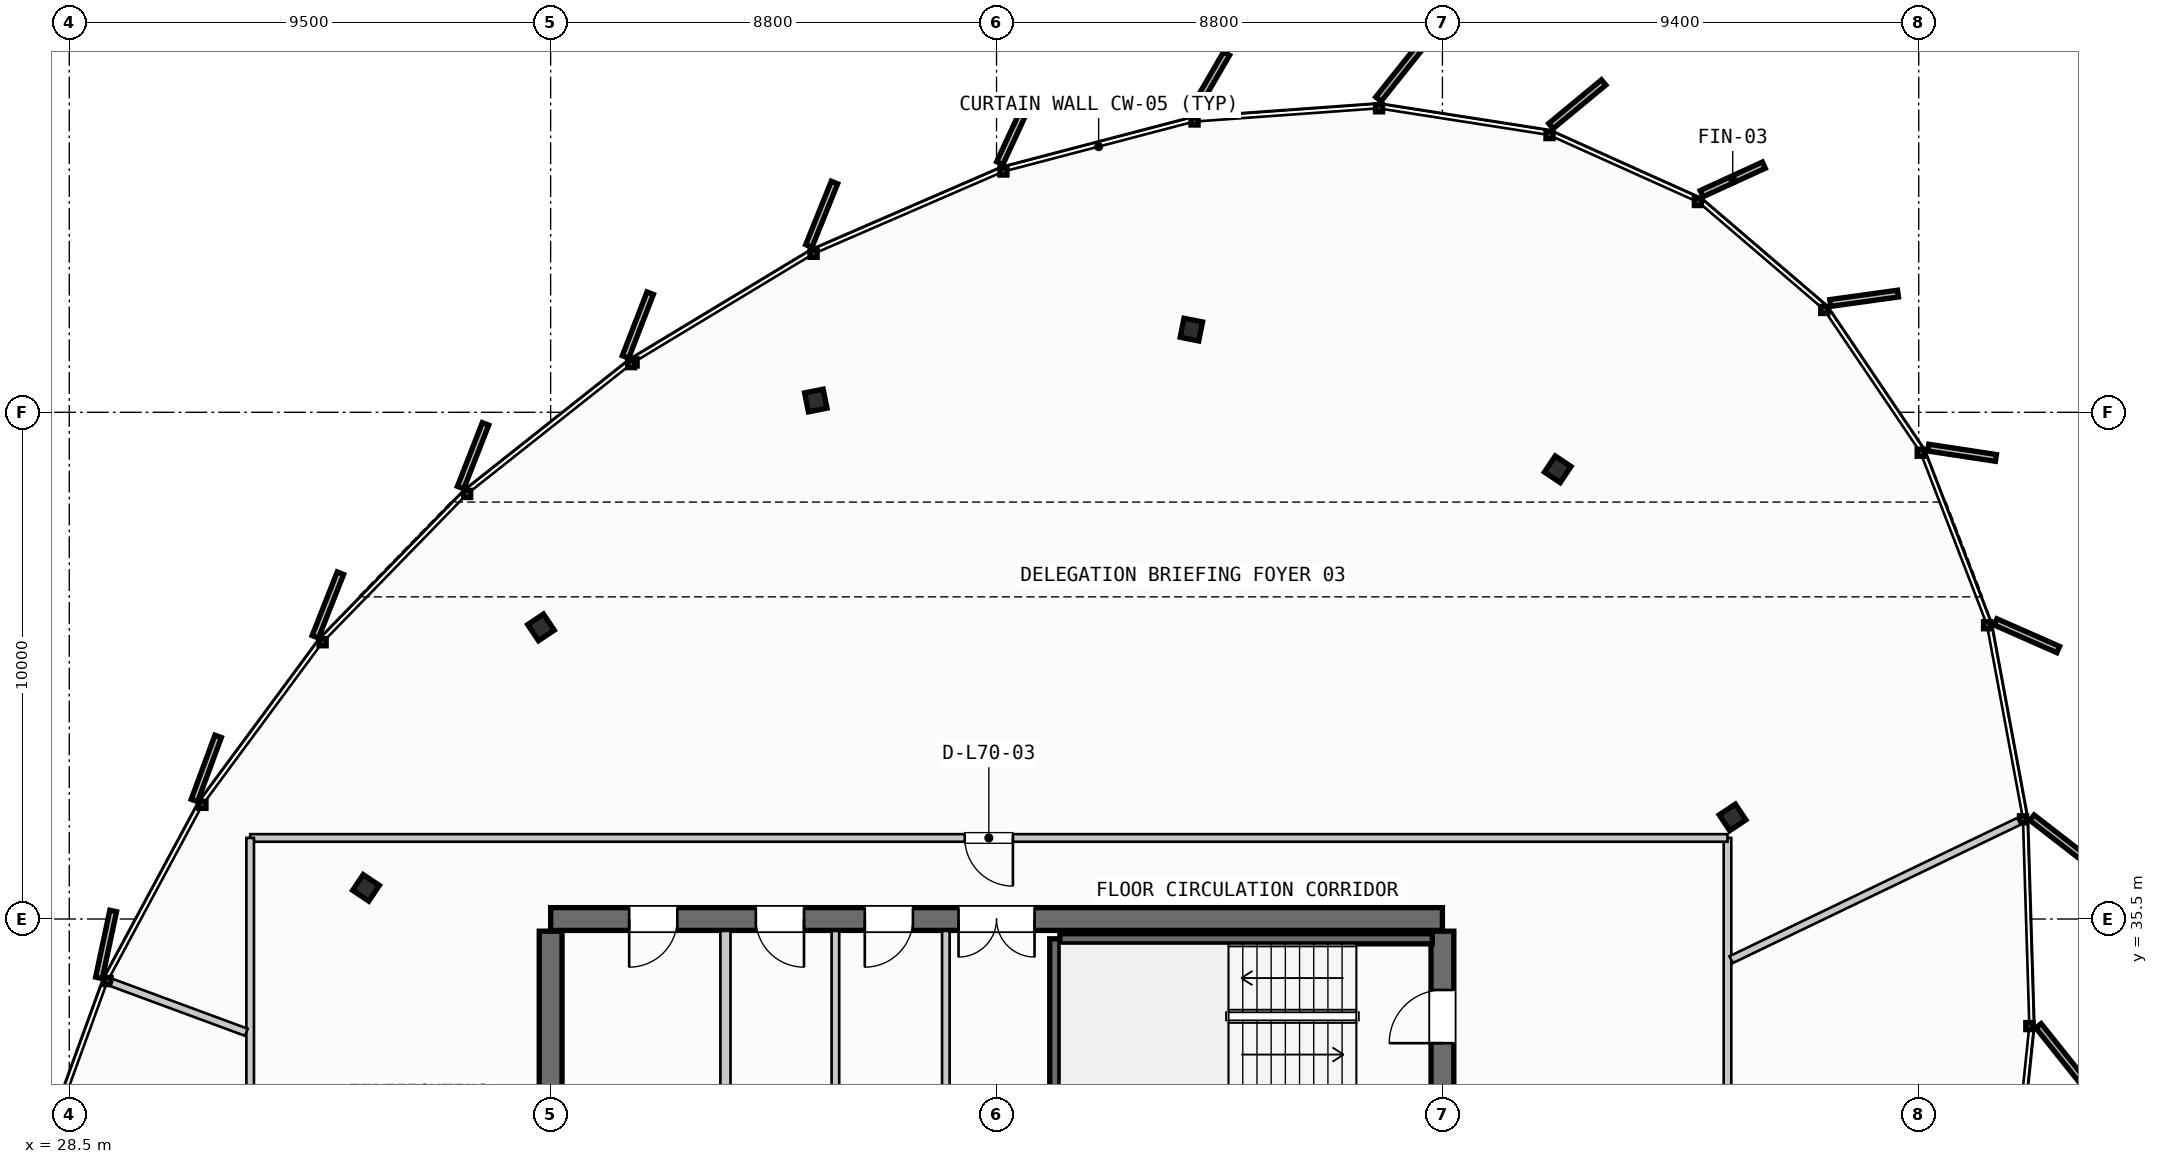
"""IFC4 building model, lengths in metres.
Left out: names, types, materials, properties, quantities, classifications, styles, units other than length and angle.
Written with IfcOpenShell. Run it as: python <this file> out.ifc"""

import sys

from ifc_helpers import new_model, si_unit, direction, frame, frame_2d, origin, origin_2d, place, context, subcontext, project, spatial, rectangle, i_section, extrude, source, transform, mapped, element, fill, save


model = new_model("IFC4")
c1 = context("Model", 3, precision=1e-05, world=origin(), true_north=direction((0.0, 1.0)))
c2 = subcontext(c1, "Body", "Model", "MODEL_VIEW")
j1 = project(units=[si_unit("LENGTHUNIT", "METRE"), si_unit("PLANEANGLEUNIT", "RADIAN")], contexts=[c1])
p1 = place(None, origin())
s1 = spatial("IfcSite", under=j1, at=p1, CompositionType="ELEMENT")
p2 = place(p1, origin())
s2 = spatial("IfcBuilding", under=s1, at=p2, CompositionType="ELEMENT")
p3 = place(p2, frame((0.0, 0.0, 266.35)))
s3 = spatial("IfcBuildingStorey", under=s2, at=p3, CompositionType="ELEMENT", Elevation=266.35)
p4 = place(p3, frame((55.6, 35.5, 0.0), z_axis=(0.0, 0.0, 1.0), x_axis=(-1.0, 0.0, 0.0)))
e1 = element("IfcWall", 1, at=p4, inside=s3, PredefinedType="SHEAR", context=c2, shape_type="SweptSolid", body=[
    extrude(rectangle(XDim=17.6, YDim=0.45, at=frame_2d((8.8, 0.0))), origin(), (0.0, 0.0, 1.0), 3.21),
])
p5 = place(p4, frame((8.05, 0.0, 0.0)))
e2 = element("IfcOpeningElement", 2, at=p5, cuts=e1, PredefinedType="OPENING", context=c2, shape_type="SweptSolid", body=[
    extrude(rectangle(XDim=1.5, YDim=2.2, at=frame_2d((0.75, 1.1))), frame((0.0, 0.235, 0.0), z_axis=(0.0, -1.0, 0.0), x_axis=(1.0, 0.0, 0.0)), (0.0, 0.0, 1.0), 0.47),
])
p6 = place(p4, frame((15.1, 0.0, 0.0)))
e3 = element("IfcOpeningElement", 3, at=p6, cuts=e1, PredefinedType="OPENING", context=c2, shape_type="SweptSolid", body=[
    extrude(rectangle(XDim=0.95, YDim=2.15, at=frame_2d((0.475, 1.075))), frame((0.0, 0.235, 0.0), z_axis=(0.0, -1.0, 0.0), x_axis=(1.0, 0.0, 0.0)), (0.0, 0.0, 1.0), 0.47),
])
p7 = place(p4, frame((12.6, 0.0, 0.0)))
e4 = element("IfcOpeningElement", 4, at=p7, cuts=e1, PredefinedType="OPENING", context=c2, shape_type="SweptSolid", body=[
    extrude(rectangle(XDim=0.95, YDim=2.15, at=frame_2d((0.475, 1.075))), frame((0.0, 0.235, 0.0), z_axis=(0.0, -1.0, 0.0), x_axis=(1.0, 0.0, 0.0)), (0.0, 0.0, 1.0), 0.47),
])
p8 = place(p4, frame((10.45, 0.0, 0.0)))
e5 = element("IfcOpeningElement", 5, at=p8, cuts=e1, PredefinedType="OPENING", context=c2, shape_type="SweptSolid", body=[
    extrude(rectangle(XDim=0.95, YDim=2.15, at=frame_2d((0.475, 1.075))), frame((0.0, 0.235, 0.0), z_axis=(0.0, -1.0, 0.0), x_axis=(1.0, 0.0, 0.0)), (0.0, 0.0, 1.0), 0.47),
])
p9 = place(p3, frame((38.0, 35.26, 0.0), z_axis=(0.0, 0.0, 1.0), x_axis=(0.0, -1.0, 0.0)))
e6 = element("IfcWall", 6, at=p9, inside=s3, PredefinedType="SHEAR", context=c2, shape_type="SweptSolid", body=[
    extrude(rectangle(XDim=14.92, YDim=0.45, at=frame_2d((7.46, 0.0))), origin(), (0.0, 0.0, 1.0), 3.21),
])
p10 = place(p9, frame((5.21, 0.0, 0.0)))
e7 = element("IfcOpeningElement", 7, at=p10, cuts=e6, PredefinedType="OPENING", context=c2, shape_type="SweptSolid", body=[
    extrude(rectangle(XDim=1.1, YDim=2.2, at=frame_2d((0.55, 1.1))), frame((0.0, 0.235, 0.0), z_axis=(0.0, -1.0, 0.0), x_axis=(1.0, 0.0, 0.0)), (0.0, 0.0, 1.0), 0.47),
])
p11 = place(p3, frame((55.6, 20.34, 0.0), z_axis=(0.0, 0.0, 1.0), x_axis=(0.0, 1.0, 0.0)))
e8 = element("IfcWall", 8, at=p11, inside=s3, PredefinedType="SHEAR", context=c2, shape_type="SweptSolid", body=[
    extrude(rectangle(XDim=14.92, YDim=0.45, at=frame_2d((7.46, 0.0))), origin(), (0.0, 0.0, 1.0), 3.21),
])
p12 = place(p11, frame((12.71, 0.0, 0.0)))
e9 = element("IfcOpeningElement", 9, at=p12, cuts=e8, PredefinedType="OPENING", context=c2, shape_type="SweptSolid", body=[
    extrude(rectangle(XDim=1.05, YDim=2.15, at=frame_2d((0.525, 1.075))), frame((0.0, 0.235, 0.0), z_axis=(0.0, -1.0, 0.0), x_axis=(1.0, 0.0, 0.0)), (0.0, 0.0, 1.0), 0.47),
])
p13 = place(p11, frame((8.61, 0.0, 0.0)))
e10 = element("IfcOpeningElement", 10, at=p13, cuts=e8, PredefinedType="OPENING", context=c2, shape_type="SweptSolid", body=[
    extrude(rectangle(XDim=1.1, YDim=2.2, at=frame_2d((0.55, 1.1))), frame((0.0, 0.235, 0.0), z_axis=(0.0, -1.0, 0.0), x_axis=(1.0, 0.0, 0.0)), (0.0, 0.0, 1.0), 0.47),
])
m1 = source(origin(), c2, "Body", "SweptSolid", [
    extrude(i_section(OverallWidth=0.374, OverallDepth=0.383, WebThickness=0.017, FlangeThickness=0.026, FilletRadius=0.015, at=origin_2d()), origin(), (0.0, 0.0, 1.0), 3.21),
])
for number, where, z_axis, x_axis in (
    (11, (61.326, 37.506, 0.0), (0.0, 0.0, 1.0), (0.831, 0.556, 0.0)),
    (12, (57.875, 44.375, 0.0), (0.0, 0.0, 1.0), (0.556, 0.831, 0.0)),
    (13, (50.645, 47.132, 0.0), (0.0, 0.0, 1.0), (0.195, 0.981, 0.0)),
    (14, (43.233, 45.732, 0.0), (0.0, 0.0, 1.0), (-0.195, 0.981, 0.0)),
    (15, (37.81, 41.255, 0.0), (0.0, 0.0, 1.0), (-0.556, 0.831, 0.0)),
    (16, (34.356, 36.115, 0.0), (0.0, 0.0, 1.0), (-0.831, 0.556, 0.0)),
):
    element("IfcColumn", number, at=place(p3, frame(where, z_axis=z_axis, x_axis=x_axis)), inside=s3, PredefinedType="COLUMN", context=c2, shape_type="MappedRepresentation", body=[
        mapped(m1, transform((0.0, 0.0, 0.0), scale=1.0)),
    ])
p14 = place(p3, frame((47.95, 32.05, 0.0), z_axis=(0.0, 0.0, 1.0), x_axis=(0.0, 1.0, 0.0)))
e17 = element("IfcWall", 17, at=p14, inside=s3, PredefinedType="SHEAR", context=c2, shape_type="SweptSolid", body=[
    extrude(rectangle(XDim=3.06, YDim=0.2, at=frame_2d((1.53, 0.0))), origin(), (0.0, 0.0, 1.0), 3.21),
])
p15 = place(p3, frame((48.05, 35.11, 0.0), z_axis=(0.0, 0.0, 1.0), x_axis=(1.0, 0.0, 0.0)))
e18 = element("IfcWall", 18, at=p15, inside=s3, PredefinedType="SHEAR", context=c2, shape_type="SweptSolid", body=[
    extrude(rectangle(XDim=7.35, YDim=0.2, at=frame_2d((3.675, 0.0))), origin(), (0.0, 0.0, 1.0), 3.21),
])
p16 = place(p3, frame((41.45, 31.85, 0.0), z_axis=(0.0, 0.0, 1.0), x_axis=(0.0, 1.0, 0.0)))
e19 = element("IfcWall", 19, at=p16, inside=s3, PredefinedType="PARTITIONING", context=c2, shape_type="SweptSolid", body=[
    extrude(rectangle(XDim=3.415, YDim=0.2, at=frame_2d((1.708, 0.0))), origin(), (0.0, 0.0, 1.0), 2.595),
])
p17 = place(p3, frame((45.8, 31.85, 0.0), z_axis=(0.0, 0.0, 1.0), x_axis=(0.0, 1.0, 0.0)))
e20 = element("IfcWall", 20, at=p17, inside=s3, PredefinedType="PARTITIONING", context=c2, shape_type="SweptSolid", body=[
    extrude(rectangle(XDim=3.415, YDim=0.15, at=frame_2d((1.708, 0.0))), origin(), (0.0, 0.0, 1.0), 2.595),
])
p18 = place(p3, frame((43.62, 31.85, 0.0), z_axis=(0.0, 0.0, 1.0), x_axis=(0.0, 1.0, 0.0)))
e21 = element("IfcWall", 21, at=p18, inside=s3, PredefinedType="PLUMBINGWALL", context=c2, shape_type="SweptSolid", body=[
    extrude(rectangle(XDim=3.415, YDim=0.15, at=frame_2d((1.708, 0.0))), origin(), (0.0, 0.0, 1.0), 2.595),
])
p19 = place(p3, frame((61.226, 18.269, 0.0), z_axis=(0.0, 0.0, 1.0), x_axis=(0.0, 1.0, 0.0)))
e22 = element("IfcWall", 22, at=p19, inside=s3, PredefinedType="PARTITIONING", context=c2, shape_type="SweptSolid", body=[
    extrude(rectangle(XDim=18.831, YDim=0.15, at=frame_2d((9.416, 0.0))), origin(), (0.0, 0.0, 1.0), 2.595),
])
p20 = place(p19, frame((8.028, 0.0, 0.0)))
e23 = element("IfcOpeningElement", 23, at=p20, cuts=e22, PredefinedType="OPENING", context=c2, shape_type="SweptSolid", body=[
    extrude(rectangle(XDim=0.95, YDim=2.15, at=frame_2d((0.475, 1.075))), frame((0.0, 0.085, 0.0), z_axis=(0.0, -1.0, 0.0), x_axis=(1.0, 0.0, 0.0)), (0.0, 0.0, 1.0), 0.17),
])
p21 = place(p3, frame((61.226, 37.1, 0.0), z_axis=(0.0, 0.0, 1.0), x_axis=(-1.0, 0.0, 0.0)))
e24 = element("IfcWall", 24, at=p21, inside=s3, PredefinedType="PARTITIONING", context=c2, shape_type="SweptSolid", body=[
    extrude(rectangle(XDim=29.156, YDim=0.15, at=frame_2d((14.578, 0.0))), origin(), (0.0, 0.0, 1.0), 2.595),
])
p22 = place(p21, frame((14.103, 0.0, 0.0)))
e25 = element("IfcOpeningElement", 25, at=p22, cuts=e24, PredefinedType="OPENING", context=c2, shape_type="SweptSolid", body=[
    extrude(rectangle(XDim=0.95, YDim=2.15, at=frame_2d((0.475, 1.075))), frame((0.0, 0.085, 0.0), z_axis=(0.0, -1.0, 0.0), x_axis=(1.0, 0.0, 0.0)), (0.0, 0.0, 1.0), 0.17),
])
p23 = place(p3, frame((32.07, 37.1, 0.0), z_axis=(0.0, 0.0, 1.0), x_axis=(0.0, -1.0, 0.0)))
e26 = element("IfcWall", 26, at=p23, inside=s3, PredefinedType="PARTITIONING", context=c2, shape_type="SweptSolid", body=[
    extrude(rectangle(XDim=18.831, YDim=0.15, at=frame_2d((9.416, 0.0))), origin(), (0.0, 0.0, 1.0), 2.595),
])
p24 = place(p23, frame((9.772, 0.0, 0.0)))
e27 = element("IfcOpeningElement", 27, at=p24, cuts=e26, PredefinedType="OPENING", context=c2, shape_type="SweptSolid", body=[
    extrude(rectangle(XDim=0.95, YDim=2.15, at=frame_2d((0.475, 1.075))), frame((0.0, 0.085, 0.0), z_axis=(0.0, -1.0, 0.0), x_axis=(1.0, 0.0, 0.0)), (0.0, 0.0, 1.0), 0.17),
])
p25 = place(p3, frame((61.298, 34.698, 0.0), z_axis=(0.0, 0.0, 1.0), x_axis=(0.901269589743, 0.433258729403, 0.0)))
e28 = element("IfcWall", 28, at=p25, inside=s3, PredefinedType="PARTITIONING", context=c2, shape_type="SweptSolid", body=[
    extrude(rectangle(XDim=6.302, YDim=0.15, at=frame_2d((3.151, 0.0))), origin(), (0.0, 0.0, 1.0), 2.595),
])
p26 = place(p3, frame((31.995, 33.265, 0.0), z_axis=(0.0, 0.0, 1.0), x_axis=(-0.938082247265, 0.346412611442, 0.0)))
e29 = element("IfcWall", 29, at=p26, inside=s3, PredefinedType="PARTITIONING", context=c2, shape_type="SweptSolid", body=[
    extrude(rectangle(XDim=2.831, YDim=0.15, at=frame_2d((1.416, 0.0))), origin(), (0.0, 0.0, 1.0), 2.595),
])
m2 = source(origin(), c2, "Body", "SweptSolid", [
    extrude(rectangle(XDim=1.05, YDim=2.15, at=frame_2d((0.525, 1.075))), frame((0.0, 0.025, 0.0), z_axis=(0.0, -1.0, 0.0), x_axis=(1.0, 0.0, 0.0)), (0.0, 0.0, 1.0), 0.05),
])
p27 = place(p12, origin())
e30 = element("IfcDoor", 30, at=p27, inside=s3, OperationType="SINGLE_SWING_LEFT", PredefinedType="DOOR", context=c2, shape_type="MappedRepresentation", body=[
    mapped(m2, transform((0.0, 0.0, 0.0), scale=1.0)),
])
fill(e9, e30)
m3 = source(origin(), c2, "Body", "SweptSolid", [
    extrude(rectangle(XDim=1.5, YDim=2.2, at=frame_2d((0.75, 1.1))), frame((0.0, 0.025, 0.0), z_axis=(0.0, -1.0, 0.0), x_axis=(1.0, 0.0, 0.0)), (0.0, 0.0, 1.0), 0.05),
])
p28 = place(p5, origin())
e31 = element("IfcDoor", 31, at=p28, inside=s3, OperationType="DOUBLE_DOOR_SINGLE_SWING", PredefinedType="DOOR", context=c2, shape_type="MappedRepresentation", body=[
    mapped(m3, transform((0.0, 0.0, 0.0), scale=1.0)),
])
fill(e2, e31)
m4 = source(origin(), c2, "Body", "SweptSolid", [
    extrude(rectangle(XDim=0.95, YDim=2.15, at=frame_2d((0.475, 1.075))), frame((0.0, 0.025, 0.0), z_axis=(0.0, -1.0, 0.0), x_axis=(1.0, 0.0, 0.0)), (0.0, 0.0, 1.0), 0.05),
])
p29 = place(p6, origin())
e32 = element("IfcDoor", 32, at=p29, inside=s3, OperationType="SINGLE_SWING_RIGHT", PredefinedType="DOOR", context=c2, shape_type="MappedRepresentation", body=[
    mapped(m4, transform((0.0, 0.0, 0.0), scale=1.0)),
])
fill(e3, e32)
p30 = place(p7, origin())
e33 = element("IfcDoor", 33, at=p30, inside=s3, OperationType="SINGLE_SWING_LEFT", PredefinedType="DOOR", context=c2, shape_type="MappedRepresentation", body=[
    mapped(m4, transform((0.0, 0.0, 0.0), scale=1.0)),
])
fill(e4, e33)
p31 = place(p8, origin())
e34 = element("IfcDoor", 34, at=p31, inside=s3, OperationType="SINGLE_SWING_RIGHT", PredefinedType="DOOR", context=c2, shape_type="MappedRepresentation", body=[
    mapped(m4, transform((0.0, 0.0, 0.0), scale=1.0)),
])
fill(e5, e34)
p32 = place(p22, origin())
e35 = element("IfcDoor", 35, at=p32, inside=s3, OperationType="SINGLE_SWING_LEFT", PredefinedType="DOOR", context=c2, shape_type="MappedRepresentation", body=[
    mapped(m4, transform((0.0, 0.0, 0.0), scale=1.0)),
])
fill(e25, e35)
save(model, sys.argv[1])
